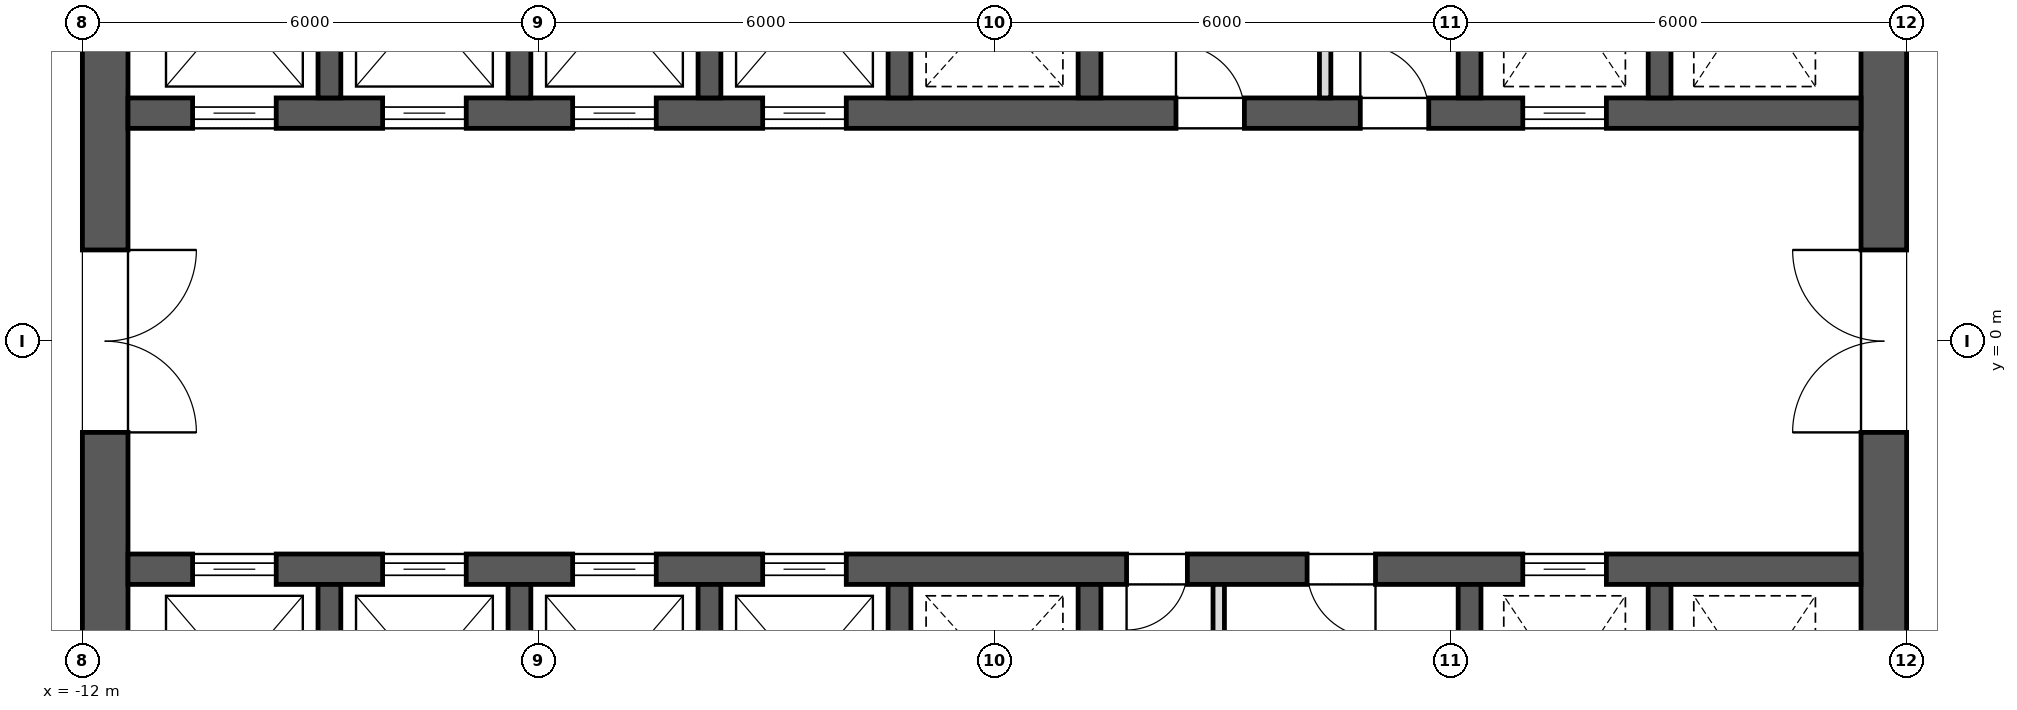
"""IFC4 building model, lengths in metres.
Left out: names, types, materials, properties, quantities, classifications, styles, units other than length and angle.
Written with IfcOpenShell. Run it as: python <this file> out.ifc"""

import sys

from ifc_helpers import new_model, si_unit, direction, frame, frame_2d, origin, place, context, subcontext, project, spatial, rectangle, extrude, element, fill, save


model = new_model("IFC4")
c1 = context("Model", 3, precision=1e-05, world=origin(), true_north=direction((0.0, 1.0)))
c2 = subcontext(c1, "Body", "Model", "MODEL_VIEW")
j1 = project(units=[si_unit("LENGTHUNIT", "METRE"), si_unit("PLANEANGLEUNIT", "RADIAN")], contexts=[c1])
p1 = place(None, origin())
s1 = spatial("IfcSite", under=j1, at=p1, CompositionType="ELEMENT")
p2 = place(p1, origin())
s2 = spatial("IfcBuilding", under=s1, at=p2, CompositionType="ELEMENT")
p3 = place(p2, frame((0.0, 0.0, 226.9)))
s3 = spatial("IfcBuildingStorey", under=s2, at=p3, CompositionType="ELEMENT", Elevation=226.9)
p4 = place(p3, frame((11.7, -11.4, 0.0), z_axis=(0.0, 0.0, 1.0), x_axis=(0.0, 1.0, 0.0)))
e1 = element("IfcWall", 1, at=p4, inside=s3, PredefinedType="SHEAR", context=c2, shape_type="SweptSolid", body=[
    extrude(rectangle(XDim=22.8, YDim=0.6, at=frame_2d((11.4, 0.0))), origin(), (0.0, 0.0, 1.0), 4.0),
])
p5 = place(p4, frame((10.2, 0.0, 0.0)))
e2 = element("IfcOpeningElement", 2, at=p5, cuts=e1, PredefinedType="OPENING", context=c2, shape_type="SweptSolid", body=[
    extrude(rectangle(XDim=2.4, YDim=2.1, at=frame_2d((1.2, 1.05))), frame((0.0, 0.312, 0.0), z_axis=(0.0, -1.0, 0.0), x_axis=(1.0, 0.0, 0.0)), (0.0, 0.0, 1.0), 0.624),
])
p6 = place(p4, frame((19.5, 0.0, 0.0)))
e3 = element("IfcOpeningElement", 3, at=p6, cuts=e1, PredefinedType="OPENING", context=c2, shape_type="SweptSolid", body=[
    extrude(rectangle(XDim=1.2, YDim=2.1, at=frame_2d((0.6, 1.05))), frame((0.0, 0.312, 0.0), z_axis=(0.0, -1.0, 0.0), x_axis=(1.0, 0.0, 0.0)), (0.0, 0.0, 1.0), 0.624),
])
p7 = place(p4, frame((2.1, 0.0, 0.0)))
e4 = element("IfcOpeningElement", 4, at=p7, cuts=e1, PredefinedType="OPENING", context=c2, shape_type="SweptSolid", body=[
    extrude(rectangle(XDim=1.2, YDim=2.1, at=frame_2d((0.6, 1.05))), frame((0.0, 0.312, 0.0), z_axis=(0.0, -1.0, 0.0), x_axis=(1.0, 0.0, 0.0)), (0.0, 0.0, 1.0), 0.624),
])
p8 = place(p3, frame((-11.7, -11.4, 0.0), z_axis=(0.0, 0.0, 1.0), x_axis=(0.0, 1.0, 0.0)))
e5 = element("IfcWall", 5, at=p8, inside=s3, PredefinedType="SHEAR", context=c2, shape_type="SweptSolid", body=[
    extrude(rectangle(XDim=22.8, YDim=0.6, at=frame_2d((11.4, 0.0))), origin(), (0.0, 0.0, 1.0), 4.0),
])
p9 = place(p8, frame((10.2, 0.0, 0.0)))
e6 = element("IfcOpeningElement", 6, at=p9, cuts=e5, PredefinedType="OPENING", context=c2, shape_type="SweptSolid", body=[
    extrude(rectangle(XDim=2.4, YDim=2.1, at=frame_2d((1.2, 1.05))), frame((0.0, 0.312, 0.0), z_axis=(0.0, -1.0, 0.0), x_axis=(1.0, 0.0, 0.0)), (0.0, 0.0, 1.0), 0.624),
])
p10 = place(p8, frame((18.925, 0.0, 0.0)))
e7 = element("IfcOpeningElement", 7, at=p10, cuts=e5, PredefinedType="OPENING", context=c2, shape_type="SweptSolid", body=[
    extrude(rectangle(XDim=1.2, YDim=2.1, at=frame_2d((0.6, 1.05))), frame((0.0, 0.312, 0.0), z_axis=(0.0, -1.0, 0.0), x_axis=(1.0, 0.0, 0.0)), (0.0, 0.0, 1.0), 0.624),
])
p11 = place(p8, frame((2.675, 0.0, 0.0)))
e8 = element("IfcOpeningElement", 8, at=p11, cuts=e5, PredefinedType="OPENING", context=c2, shape_type="SweptSolid", body=[
    extrude(rectangle(XDim=1.2, YDim=2.1, at=frame_2d((0.6, 1.05))), frame((0.0, 0.312, 0.0), z_axis=(0.0, -1.0, 0.0), x_axis=(1.0, 0.0, 0.0)), (0.0, 0.0, 1.0), 0.624),
])
p12 = place(p3, frame((-11.4, 3.0, 0.0), z_axis=(0.0, 0.0, 1.0), x_axis=(1.0, 0.0, 0.0)))
e9 = element("IfcWall", 9, at=p12, inside=s3, PredefinedType="SHEAR", context=c2, shape_type="SweptSolid", body=[
    extrude(rectangle(XDim=22.8, YDim=0.4, at=frame_2d((11.4, 0.0))), origin(), (0.0, 0.0, 1.0), 4.0),
])
p13 = place(p12, frame((0.85, 0.0, 0.0)))
e10 = element("IfcOpeningElement", 10, at=p13, cuts=e9, PredefinedType="OPENING", context=c2, shape_type="SweptSolid", body=[
    extrude(rectangle(XDim=1.1, YDim=2.1, at=frame_2d((0.55, 1.05))), frame((0.0, 0.212, 0.0), z_axis=(0.0, -1.0, 0.0), x_axis=(1.0, 0.0, 0.0)), (0.0, 0.0, 1.0), 0.424),
])
p14 = place(p12, frame((3.35, 0.0, 0.0)))
e11 = element("IfcOpeningElement", 11, at=p14, cuts=e9, PredefinedType="OPENING", context=c2, shape_type="SweptSolid", body=[
    extrude(rectangle(XDim=1.1, YDim=2.1, at=frame_2d((0.55, 1.05))), frame((0.0, 0.212, 0.0), z_axis=(0.0, -1.0, 0.0), x_axis=(1.0, 0.0, 0.0)), (0.0, 0.0, 1.0), 0.424),
])
p15 = place(p12, frame((5.85, 0.0, 0.0)))
e12 = element("IfcOpeningElement", 12, at=p15, cuts=e9, PredefinedType="OPENING", context=c2, shape_type="SweptSolid", body=[
    extrude(rectangle(XDim=1.1, YDim=2.1, at=frame_2d((0.55, 1.05))), frame((0.0, 0.212, 0.0), z_axis=(0.0, -1.0, 0.0), x_axis=(1.0, 0.0, 0.0)), (0.0, 0.0, 1.0), 0.424),
])
p16 = place(p12, frame((8.35, 0.0, 0.0)))
e13 = element("IfcOpeningElement", 13, at=p16, cuts=e9, PredefinedType="OPENING", context=c2, shape_type="SweptSolid", body=[
    extrude(rectangle(XDim=1.1, YDim=2.1, at=frame_2d((0.55, 1.05))), frame((0.0, 0.212, 0.0), z_axis=(0.0, -1.0, 0.0), x_axis=(1.0, 0.0, 0.0)), (0.0, 0.0, 1.0), 0.424),
])
p17 = place(p12, frame((18.35, 0.0, 0.0)))
e14 = element("IfcOpeningElement", 14, at=p17, cuts=e9, PredefinedType="OPENING", context=c2, shape_type="SweptSolid", body=[
    extrude(rectangle(XDim=1.1, YDim=2.1, at=frame_2d((0.55, 1.05))), frame((0.0, 0.212, 0.0), z_axis=(0.0, -1.0, 0.0), x_axis=(1.0, 0.0, 0.0)), (0.0, 0.0, 1.0), 0.424),
])
p18 = place(p12, frame((13.788, 0.0, 0.0)))
e15 = element("IfcOpeningElement", 15, at=p18, cuts=e9, PredefinedType="OPENING", context=c2, shape_type="SweptSolid", body=[
    extrude(rectangle(XDim=0.9, YDim=2.1, at=frame_2d((0.45, 1.05))), frame((0.0, 0.212, 0.0), z_axis=(0.0, -1.0, 0.0), x_axis=(1.0, 0.0, 0.0)), (0.0, 0.0, 1.0), 0.424),
])
p19 = place(p12, frame((16.212, 0.0, 0.0)))
e16 = element("IfcOpeningElement", 16, at=p19, cuts=e9, PredefinedType="OPENING", context=c2, shape_type="SweptSolid", body=[
    extrude(rectangle(XDim=0.9, YDim=2.1, at=frame_2d((0.45, 1.05))), frame((0.0, 0.212, 0.0), z_axis=(0.0, -1.0, 0.0), x_axis=(1.0, 0.0, 0.0)), (0.0, 0.0, 1.0), 0.424),
])
for number, where, z_axis, x_axis in (
    (17, (-8.75, 3.2, 0.0), (0.0, 0.0, 1.0), (0.0, 1.0, 0.0)),
    (18, (-6.25, 3.2, 0.0), (0.0, 0.0, 1.0), (0.0, 1.0, 0.0)),
    (19, (-3.75, 3.2, 0.0), (0.0, 0.0, 1.0), (0.0, 1.0, 0.0)),
    (20, (-1.25, 3.2, 0.0), (0.0, 0.0, 1.0), (0.0, 1.0, 0.0)),
    (21, (1.25, 3.2, 0.0), (0.0, 0.0, 1.0), (0.0, 1.0, 0.0)),
    (22, (6.25, 3.2, 0.0), (0.0, 0.0, 1.0), (0.0, 1.0, 0.0)),
    (23, (8.75, 3.2, 0.0), (0.0, 0.0, 1.0), (0.0, 1.0, 0.0)),
):
    element("IfcWall", number, at=place(p3, frame(where, z_axis=z_axis, x_axis=x_axis)), inside=s3, PredefinedType="SHEAR", context=c2, shape_type="SweptSolid", body=[
        extrude(rectangle(XDim=2.9, YDim=0.3, at=frame_2d((1.45, 0.0))), origin(), (0.0, 0.0, 1.0), 4.0),
    ])
p20 = place(p3, frame((-11.4, -3.0, 0.0), z_axis=(0.0, 0.0, 1.0), x_axis=(1.0, 0.0, 0.0)))
e24 = element("IfcWall", 24, at=p20, inside=s3, PredefinedType="SHEAR", context=c2, shape_type="SweptSolid", body=[
    extrude(rectangle(XDim=22.8, YDim=0.4, at=frame_2d((11.4, 0.0))), origin(), (0.0, 0.0, 1.0), 4.0),
])
p21 = place(p20, frame((0.85, 0.0, 0.0)))
e25 = element("IfcOpeningElement", 25, at=p21, cuts=e24, PredefinedType="OPENING", context=c2, shape_type="SweptSolid", body=[
    extrude(rectangle(XDim=1.1, YDim=2.1, at=frame_2d((0.55, 1.05))), frame((0.0, 0.212, 0.0), z_axis=(0.0, -1.0, 0.0), x_axis=(1.0, 0.0, 0.0)), (0.0, 0.0, 1.0), 0.424),
])
p22 = place(p20, frame((3.35, 0.0, 0.0)))
e26 = element("IfcOpeningElement", 26, at=p22, cuts=e24, PredefinedType="OPENING", context=c2, shape_type="SweptSolid", body=[
    extrude(rectangle(XDim=1.1, YDim=2.1, at=frame_2d((0.55, 1.05))), frame((0.0, 0.212, 0.0), z_axis=(0.0, -1.0, 0.0), x_axis=(1.0, 0.0, 0.0)), (0.0, 0.0, 1.0), 0.424),
])
p23 = place(p20, frame((5.85, 0.0, 0.0)))
e27 = element("IfcOpeningElement", 27, at=p23, cuts=e24, PredefinedType="OPENING", context=c2, shape_type="SweptSolid", body=[
    extrude(rectangle(XDim=1.1, YDim=2.1, at=frame_2d((0.55, 1.05))), frame((0.0, 0.212, 0.0), z_axis=(0.0, -1.0, 0.0), x_axis=(1.0, 0.0, 0.0)), (0.0, 0.0, 1.0), 0.424),
])
p24 = place(p20, frame((8.35, 0.0, 0.0)))
e28 = element("IfcOpeningElement", 28, at=p24, cuts=e24, PredefinedType="OPENING", context=c2, shape_type="SweptSolid", body=[
    extrude(rectangle(XDim=1.1, YDim=2.1, at=frame_2d((0.55, 1.05))), frame((0.0, 0.212, 0.0), z_axis=(0.0, -1.0, 0.0), x_axis=(1.0, 0.0, 0.0)), (0.0, 0.0, 1.0), 0.424),
])
p25 = place(p20, frame((18.35, 0.0, 0.0)))
e29 = element("IfcOpeningElement", 29, at=p25, cuts=e24, PredefinedType="OPENING", context=c2, shape_type="SweptSolid", body=[
    extrude(rectangle(XDim=1.1, YDim=2.1, at=frame_2d((0.55, 1.05))), frame((0.0, 0.212, 0.0), z_axis=(0.0, -1.0, 0.0), x_axis=(1.0, 0.0, 0.0)), (0.0, 0.0, 1.0), 0.424),
])
p26 = place(p20, frame((13.137, 0.0, 0.0)))
e30 = element("IfcOpeningElement", 30, at=p26, cuts=e24, PredefinedType="OPENING", context=c2, shape_type="SweptSolid", body=[
    extrude(rectangle(XDim=0.8, YDim=2.1, at=frame_2d((0.4, 1.05))), frame((0.0, 0.212, 0.0), z_axis=(0.0, -1.0, 0.0), x_axis=(1.0, 0.0, 0.0)), (0.0, 0.0, 1.0), 0.424),
])
p27 = place(p20, frame((15.512, 0.0, 0.0)))
e31 = element("IfcOpeningElement", 31, at=p27, cuts=e24, PredefinedType="OPENING", context=c2, shape_type="SweptSolid", body=[
    extrude(rectangle(XDim=0.9, YDim=2.1, at=frame_2d((0.45, 1.05))), frame((0.0, 0.212, 0.0), z_axis=(0.0, -1.0, 0.0), x_axis=(1.0, 0.0, 0.0)), (0.0, 0.0, 1.0), 0.424),
])
for number, where, z_axis, x_axis in (
    (32, (-8.75, -6.1, 0.0), (0.0, 0.0, 1.0), (0.0, 1.0, 0.0)),
    (33, (-6.25, -6.1, 0.0), (0.0, 0.0, 1.0), (0.0, 1.0, 0.0)),
    (34, (-3.75, -6.1, 0.0), (0.0, 0.0, 1.0), (0.0, 1.0, 0.0)),
    (35, (-1.25, -6.1, 0.0), (0.0, 0.0, 1.0), (0.0, 1.0, 0.0)),
    (36, (1.25, -6.1, 0.0), (0.0, 0.0, 1.0), (0.0, 1.0, 0.0)),
    (37, (6.25, -6.1, 0.0), (0.0, 0.0, 1.0), (0.0, 1.0, 0.0)),
    (38, (8.75, -6.1, 0.0), (0.0, 0.0, 1.0), (0.0, 1.0, 0.0)),
):
    element("IfcWall", number, at=place(p3, frame(where, z_axis=z_axis, x_axis=x_axis)), inside=s3, PredefinedType="SHEAR", context=c2, shape_type="SweptSolid", body=[
        extrude(rectangle(XDim=2.9, YDim=0.3, at=frame_2d((1.45, 0.0))), origin(), (0.0, 0.0, 1.0), 4.0),
    ])
for number, where, z_axis, x_axis in (
    (39, (4.35, 3.2, 0.0), (0.0, 0.0, 1.0), (0.0, 1.0, 0.0)),
    (40, (2.95, -6.1, 0.0), (0.0, 0.0, 1.0), (0.0, 1.0, 0.0)),
):
    element("IfcWall", number, at=place(p3, frame(where, z_axis=z_axis, x_axis=x_axis)), inside=s3, PredefinedType="PARTITIONING", context=c2, shape_type="SweptSolid", body=[
        extrude(rectangle(XDim=2.9, YDim=0.15, at=frame_2d((1.45, 0.0))), origin(), (0.0, 0.0, 1.0), 3.7),
    ])
p28 = place(p13, origin())
e41 = element("IfcDoor", 41, at=p28, inside=s3, OperationType="SLIDING_TO_LEFT", PredefinedType="DOOR", context=c2, shape_type="SweptSolid", body=[
    extrude(rectangle(XDim=1.1, YDim=2.1, at=frame_2d((0.55, 1.05))), frame((0.0, 0.025, 0.0), z_axis=(0.0, -1.0, 0.0), x_axis=(1.0, 0.0, 0.0)), (0.0, 0.0, 1.0), 0.05),
])
fill(e10, e41)
p29 = place(p14, origin())
e42 = element("IfcDoor", 42, at=p29, inside=s3, OperationType="SLIDING_TO_LEFT", PredefinedType="DOOR", context=c2, shape_type="SweptSolid", body=[
    extrude(rectangle(XDim=1.1, YDim=2.1, at=frame_2d((0.55, 1.05))), frame((0.0, 0.025, 0.0), z_axis=(0.0, -1.0, 0.0), x_axis=(1.0, 0.0, 0.0)), (0.0, 0.0, 1.0), 0.05),
])
fill(e11, e42)
p30 = place(p21, origin())
e43 = element("IfcDoor", 43, at=p30, inside=s3, OperationType="SLIDING_TO_LEFT", PredefinedType="DOOR", context=c2, shape_type="SweptSolid", body=[
    extrude(rectangle(XDim=1.1, YDim=2.1, at=frame_2d((0.55, 1.05))), frame((0.0, 0.025, 0.0), z_axis=(0.0, -1.0, 0.0), x_axis=(1.0, 0.0, 0.0)), (0.0, 0.0, 1.0), 0.05),
])
fill(e25, e43)
p31 = place(p22, origin())
e44 = element("IfcDoor", 44, at=p31, inside=s3, OperationType="SLIDING_TO_LEFT", PredefinedType="DOOR", context=c2, shape_type="SweptSolid", body=[
    extrude(rectangle(XDim=1.1, YDim=2.1, at=frame_2d((0.55, 1.05))), frame((0.0, 0.025, 0.0), z_axis=(0.0, -1.0, 0.0), x_axis=(1.0, 0.0, 0.0)), (0.0, 0.0, 1.0), 0.05),
])
fill(e26, e44)
p32 = place(p15, origin())
e45 = element("IfcDoor", 45, at=p32, inside=s3, OperationType="SLIDING_TO_LEFT", PredefinedType="DOOR", context=c2, shape_type="SweptSolid", body=[
    extrude(rectangle(XDim=1.1, YDim=2.1, at=frame_2d((0.55, 1.05))), frame((0.0, 0.025, 0.0), z_axis=(0.0, -1.0, 0.0), x_axis=(1.0, 0.0, 0.0)), (0.0, 0.0, 1.0), 0.05),
])
fill(e12, e45)
p33 = place(p16, origin())
e46 = element("IfcDoor", 46, at=p33, inside=s3, OperationType="SLIDING_TO_LEFT", PredefinedType="DOOR", context=c2, shape_type="SweptSolid", body=[
    extrude(rectangle(XDim=1.1, YDim=2.1, at=frame_2d((0.55, 1.05))), frame((0.0, 0.025, 0.0), z_axis=(0.0, -1.0, 0.0), x_axis=(1.0, 0.0, 0.0)), (0.0, 0.0, 1.0), 0.05),
])
fill(e13, e46)
p34 = place(p23, origin())
e47 = element("IfcDoor", 47, at=p34, inside=s3, OperationType="SLIDING_TO_LEFT", PredefinedType="DOOR", context=c2, shape_type="SweptSolid", body=[
    extrude(rectangle(XDim=1.1, YDim=2.1, at=frame_2d((0.55, 1.05))), frame((0.0, 0.025, 0.0), z_axis=(0.0, -1.0, 0.0), x_axis=(1.0, 0.0, 0.0)), (0.0, 0.0, 1.0), 0.05),
])
fill(e27, e47)
p35 = place(p24, origin())
e48 = element("IfcDoor", 48, at=p35, inside=s3, OperationType="SLIDING_TO_LEFT", PredefinedType="DOOR", context=c2, shape_type="SweptSolid", body=[
    extrude(rectangle(XDim=1.1, YDim=2.1, at=frame_2d((0.55, 1.05))), frame((0.0, 0.025, 0.0), z_axis=(0.0, -1.0, 0.0), x_axis=(1.0, 0.0, 0.0)), (0.0, 0.0, 1.0), 0.05),
])
fill(e28, e48)
p36 = place(p17, origin())
e49 = element("IfcDoor", 49, at=p36, inside=s3, OperationType="SLIDING_TO_LEFT", PredefinedType="DOOR", context=c2, shape_type="SweptSolid", body=[
    extrude(rectangle(XDim=1.1, YDim=2.1, at=frame_2d((0.55, 1.05))), frame((0.0, 0.025, 0.0), z_axis=(0.0, -1.0, 0.0), x_axis=(1.0, 0.0, 0.0)), (0.0, 0.0, 1.0), 0.05),
])
fill(e14, e49)
p37 = place(p25, origin())
e50 = element("IfcDoor", 50, at=p37, inside=s3, OperationType="SLIDING_TO_LEFT", PredefinedType="DOOR", context=c2, shape_type="SweptSolid", body=[
    extrude(rectangle(XDim=1.1, YDim=2.1, at=frame_2d((0.55, 1.05))), frame((0.0, 0.025, 0.0), z_axis=(0.0, -1.0, 0.0), x_axis=(1.0, 0.0, 0.0)), (0.0, 0.0, 1.0), 0.05),
])
fill(e29, e50)
p38 = place(p9, frame((2.4, 0.0, 0.0), z_axis=(0.0, 0.0, 1.0), x_axis=(-1.0, 0.0, 0.0)))
e51 = element("IfcDoor", 51, at=p38, inside=s3, OperationType="DOUBLE_DOOR_SINGLE_SWING", PredefinedType="DOOR", context=c2, shape_type="SweptSolid", body=[
    extrude(rectangle(XDim=2.4, YDim=2.1, at=frame_2d((1.2, 1.05))), frame((0.0, 0.025, 0.0), z_axis=(0.0, -1.0, 0.0), x_axis=(1.0, 0.0, 0.0)), (0.0, 0.0, 1.0), 0.05),
])
fill(e6, e51)
p39 = place(p5, origin())
e52 = element("IfcDoor", 52, at=p39, inside=s3, OperationType="DOUBLE_DOOR_SINGLE_SWING", PredefinedType="DOOR", context=c2, shape_type="SweptSolid", body=[
    extrude(rectangle(XDim=2.4, YDim=2.1, at=frame_2d((1.2, 1.05))), frame((0.0, 0.025, 0.0), z_axis=(0.0, -1.0, 0.0), x_axis=(1.0, 0.0, 0.0)), (0.0, 0.0, 1.0), 0.05),
])
fill(e2, e52)
p40 = place(p18, origin())
e53 = element("IfcDoor", 53, at=p40, inside=s3, OperationType="SINGLE_SWING_RIGHT", PredefinedType="DOOR", context=c2, shape_type="SweptSolid", body=[
    extrude(rectangle(XDim=0.9, YDim=2.1, at=frame_2d((0.45, 1.05))), frame((0.0, 0.025, 0.0), z_axis=(0.0, -1.0, 0.0), x_axis=(1.0, 0.0, 0.0)), (0.0, 0.0, 1.0), 0.05),
])
fill(e15, e53)
p41 = place(p19, origin())
e54 = element("IfcDoor", 54, at=p41, inside=s3, OperationType="SINGLE_SWING_RIGHT", PredefinedType="DOOR", context=c2, shape_type="SweptSolid", body=[
    extrude(rectangle(XDim=0.9, YDim=2.1, at=frame_2d((0.45, 1.05))), frame((0.0, 0.025, 0.0), z_axis=(0.0, -1.0, 0.0), x_axis=(1.0, 0.0, 0.0)), (0.0, 0.0, 1.0), 0.05),
])
fill(e16, e54)
p42 = place(p26, frame((0.8, 0.0, 0.0), z_axis=(0.0, 0.0, 1.0), x_axis=(-1.0, 0.0, 0.0)))
e55 = element("IfcDoor", 55, at=p42, inside=s3, OperationType="SINGLE_SWING_LEFT", PredefinedType="DOOR", context=c2, shape_type="SweptSolid", body=[
    extrude(rectangle(XDim=0.8, YDim=2.1, at=frame_2d((0.4, 1.05))), frame((0.0, 0.025, 0.0), z_axis=(0.0, -1.0, 0.0), x_axis=(1.0, 0.0, 0.0)), (0.0, 0.0, 1.0), 0.05),
])
fill(e30, e55)
p43 = place(p27, frame((0.9, 0.0, 0.0), z_axis=(0.0, 0.0, 1.0), x_axis=(-1.0, 0.0, 0.0)))
e56 = element("IfcDoor", 56, at=p43, inside=s3, OperationType="SINGLE_SWING_RIGHT", PredefinedType="DOOR", context=c2, shape_type="SweptSolid", body=[
    extrude(rectangle(XDim=0.9, YDim=2.1, at=frame_2d((0.45, 1.05))), frame((0.0, 0.025, 0.0), z_axis=(0.0, -1.0, 0.0), x_axis=(1.0, 0.0, 0.0)), (0.0, 0.0, 1.0), 0.05),
])
fill(e31, e56)
save(model, sys.argv[1])
